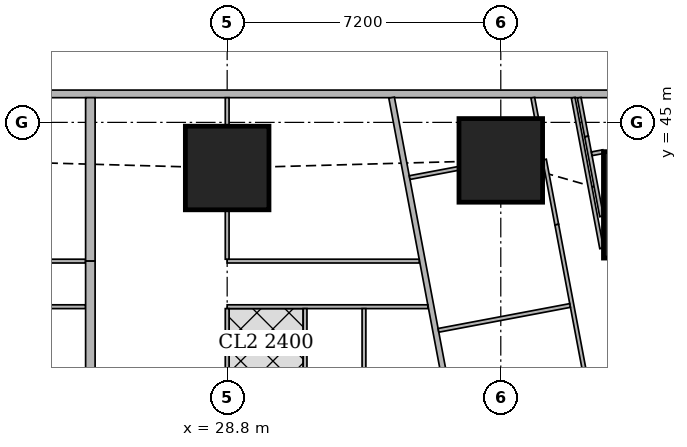
"""IFC4 building model, lengths in metres.
Left out: names, types, materials, properties, quantities, classifications, styles, units other than length and angle.
Written with IfcOpenShell. Run it as: python <this file> out.ifc"""

import sys

from ifc_helpers import new_model, si_unit, direction, frame, frame_2d, origin, origin_2d, place, context, subcontext, project, spatial, rectangle, extrude, element, fill, save


model = new_model("IFC4")
c1 = context("Model", 3, precision=1e-05, world=origin(), true_north=direction((0.0, 1.0)))
c2 = subcontext(c1, "Body", "Model", "MODEL_VIEW")
j1 = project(units=[si_unit("LENGTHUNIT", "METRE"), si_unit("PLANEANGLEUNIT", "RADIAN")], contexts=[c1])
p1 = place(None, origin())
s1 = spatial("IfcSite", under=j1, at=p1, CompositionType="ELEMENT")
p2 = place(p1, origin())
s2 = spatial("IfcBuilding", under=s1, at=p2, CompositionType="ELEMENT")
p3 = place(p2, frame((0.0, 0.0, 89.15)))
s3 = spatial("IfcBuildingStorey", under=s2, at=p3, CompositionType="ELEMENT", Elevation=89.15)
p4 = place(p3, frame((40.102, 42.83, 0.0), z_axis=(0.0, 0.0, 1.0), x_axis=(1.0, 0.0, 0.0)))
e1 = element("IfcColumn", 1, at=p4, inside=s3, PredefinedType="COLUMN", context=c2, shape_type="SweptSolid", body=[
    extrude(rectangle(XDim=2.8, YDim=2.8, at=origin_2d()), origin(), (0.0, 0.0, 1.0), 3.75),
])
for number, where, z_axis, x_axis in (
    (2, (28.8, 43.8, 0.0), (0.0, 0.0, 1.0), (1.0, 0.0, 0.0)),
    (3, (36.0, 44.0, 0.0), (0.0, 0.0, 1.0), (1.0, 0.0, 0.0)),
):
    element("IfcColumn", number, at=place(p3, frame(where, z_axis=z_axis, x_axis=x_axis)), inside=s3, PredefinedType="COLUMN", context=c2, shape_type="SweptSolid", body=[
        extrude(rectangle(XDim=2.2, YDim=2.2, at=origin_2d()), origin(), (0.0, 0.0, 1.0), 3.75),
    ])
p5 = place(p3, frame((40.106, 45.75, 0.0), z_axis=(0.0, 0.0, 1.0), x_axis=(-1.0, 0.0, 0.0)))
e4 = element("IfcWall", 4, at=p5, inside=s3, PredefinedType="SOLIDWALL", context=c2, shape_type="SweptSolid", body=[
    extrude(rectangle(XDim=37.943, YDim=0.2, at=frame_2d((18.971, 0.0))), origin(), (0.0, 0.0, 1.0), 3.5),
])
p6 = place(p5, frame((8.606, 0.0, 0.9)))
e5 = element("IfcOpeningElement", 5, at=p6, cuts=e4, PredefinedType="OPENING", context=c2, shape_type="SweptSolid", body=[
    extrude(rectangle(XDim=1.8, YDim=1.5, at=frame_2d((0.9, 0.75))), frame((0.0, 0.11, 0.0), z_axis=(0.0, -1.0, 0.0), x_axis=(1.0, 0.0, 0.0)), (0.0, 0.0, 1.0), 0.22),
])
p7 = place(p5, frame((12.206, 0.0, 0.9)))
e6 = element("IfcOpeningElement", 6, at=p7, cuts=e4, PredefinedType="OPENING", context=c2, shape_type="SweptSolid", body=[
    extrude(rectangle(XDim=1.8, YDim=1.5, at=frame_2d((0.9, 0.75))), frame((0.0, 0.11, 0.0), z_axis=(0.0, -1.0, 0.0), x_axis=(1.0, 0.0, 0.0)), (0.0, 0.0, 1.0), 0.22),
])
p8 = place(p5, frame((15.806, 0.0, 0.9)))
e7 = element("IfcOpeningElement", 7, at=p8, cuts=e4, PredefinedType="OPENING", context=c2, shape_type="SweptSolid", body=[
    extrude(rectangle(XDim=1.8, YDim=1.5, at=frame_2d((0.9, 0.75))), frame((0.0, 0.11, 0.0), z_axis=(0.0, -1.0, 0.0), x_axis=(1.0, 0.0, 0.0)), (0.0, 0.0, 1.0), 0.22),
])
p9 = place(p5, frame((19.406, 0.0, 0.9)))
e8 = element("IfcOpeningElement", 8, at=p9, cuts=e4, PredefinedType="OPENING", context=c2, shape_type="SweptSolid", body=[
    extrude(rectangle(XDim=1.8, YDim=1.5, at=frame_2d((0.9, 0.75))), frame((0.0, 0.11, 0.0), z_axis=(0.0, -1.0, 0.0), x_axis=(1.0, 0.0, 0.0)), (0.0, 0.0, 1.0), 0.22),
])
p10 = place(p5, frame((23.006, 0.0, 0.9)))
e9 = element("IfcOpeningElement", 9, at=p10, cuts=e4, PredefinedType="OPENING", context=c2, shape_type="SweptSolid", body=[
    extrude(rectangle(XDim=1.8, YDim=1.5, at=frame_2d((0.9, 0.75))), frame((0.0, 0.11, 0.0), z_axis=(0.0, -1.0, 0.0), x_axis=(1.0, 0.0, 0.0)), (0.0, 0.0, 1.0), 0.22),
])
p11 = place(p5, frame((26.606, 0.0, 0.9)))
e10 = element("IfcOpeningElement", 10, at=p11, cuts=e4, PredefinedType="OPENING", context=c2, shape_type="SweptSolid", body=[
    extrude(rectangle(XDim=1.8, YDim=1.5, at=frame_2d((0.9, 0.75))), frame((0.0, 0.11, 0.0), z_axis=(0.0, -1.0, 0.0), x_axis=(1.0, 0.0, 0.0)), (0.0, 0.0, 1.0), 0.22),
])
p12 = place(p3, frame((33.127, 45.65, 0.0), z_axis=(0.0, 0.0, 1.0), x_axis=(0.185598547723, -0.98262565562, 0.0)))
e11 = element("IfcWall", 11, at=p12, inside=s3, PredefinedType="SOLIDWALL", context=c2, shape_type="SweptSolid", body=[
    extrude(rectangle(XDim=47.118, YDim=0.15, at=frame_2d((23.559, 0.0))), origin(), (0.0, 0.0, 1.0), 2.2),
])
p13 = place(p12, frame((15.285, 0.0, 0.0)))
e12 = element("IfcOpeningElement", 12, at=p13, cuts=e11, PredefinedType="OPENING", context=c2, shape_type="SweptSolid", body=[
    extrude(rectangle(XDim=1.0, YDim=2.1, at=frame_2d((0.5, 1.05))), frame((0.0, 0.085, 0.0), z_axis=(0.0, -1.0, 0.0), x_axis=(1.0, 0.0, 0.0)), (0.0, 0.0, 1.0), 0.17),
])
p14 = place(p12, frame((19.102, 0.0, 0.0)))
e13 = element("IfcOpeningElement", 13, at=p14, cuts=e11, PredefinedType="OPENING", context=c2, shape_type="SweptSolid", body=[
    extrude(rectangle(XDim=1.0, YDim=2.1, at=frame_2d((0.5, 1.05))), frame((0.0, 0.085, 0.0), z_axis=(0.0, -1.0, 0.0), x_axis=(1.0, 0.0, 0.0)), (0.0, 0.0, 1.0), 0.17),
])
p15 = place(p12, frame((33.88, 0.0, 0.0)))
e14 = element("IfcOpeningElement", 14, at=p15, cuts=e11, PredefinedType="OPENING", context=c2, shape_type="SweptSolid", body=[
    extrude(rectangle(XDim=1.0, YDim=2.1, at=frame_2d((0.5, 1.05))), frame((0.0, 0.085, 0.0), z_axis=(0.0, -1.0, 0.0), x_axis=(1.0, 0.0, 0.0)), (0.0, 0.0, 1.0), 0.17),
])
p16 = place(p3, frame((38.654, 41.686, 0.0), z_axis=(0.0, 0.0, 1.0), x_axis=(-0.185676896978, 0.982610853761, 0.0)))
e15 = element("IfcWall", 15, at=p16, inside=s3, PredefinedType="PARTITIONING", context=c2, shape_type="SweptSolid", body=[
    extrude(rectangle(XDim=4.034, YDim=0.1, at=frame_2d((2.017, 0.0))), origin(), (0.0, 0.0, 1.0), 2.05),
])
p17 = place(p3, frame((38.063, 45.65, 0.0), z_axis=(0.0, 0.0, 1.0), x_axis=(0.185677287841, -0.982610779902, 0.0)))
e16 = element("IfcWall", 16, at=p17, inside=s3, PredefinedType="PARTITIONING", context=c2, shape_type="SweptSolid", body=[
    extrude(rectangle(XDim=1.04, YDim=0.1, at=frame_2d((0.52, 0.0))), origin(), (0.0, 0.0, 1.0), 3.5),
])
p18 = place(p3, frame((38.256, 44.628, 0.0), z_axis=(0.0, 0.0, 1.0), x_axis=(0.185757524649, -0.982595614704, 0.0)))
e17 = element("IfcWall", 17, at=p18, inside=s3, PredefinedType="PARTITIONING", context=c2, shape_type="SweptSolid", body=[
    extrude(rectangle(XDim=2.137, YDim=0.1, at=frame_2d((1.068, 0.0))), origin(), (0.0, 0.0, 1.0), 2.05),
])
p19 = place(p3, frame((38.862, 41.42, 0.0), z_axis=(0.0, 0.0, 1.0), x_axis=(0.185574815416, -0.982630137887, 0.0)))
e18 = element("IfcWall", 18, at=p19, inside=s3, PredefinedType="PARTITIONING", context=c2, shape_type="SweptSolid", body=[
    extrude(rectangle(XDim=8.605, YDim=0.1, at=frame_2d((4.303, 0.0))), origin(), (0.0, 0.0, 1.0), 3.5),
])
p20 = place(p19, frame((7.555, 0.0, 0.0)))
e19 = element("IfcOpeningElement", 19, at=p20, cuts=e18, PredefinedType="OPENING", context=c2, shape_type="SweptSolid", body=[
    extrude(rectangle(XDim=0.9, YDim=2.1, at=frame_2d((0.45, 1.05))), frame((0.0, 0.06, 0.0), z_axis=(0.0, -1.0, 0.0), x_axis=(1.0, 0.0, 0.0)), (0.0, 0.0, 1.0), 0.12),
])
p21 = place(p19, frame((3.579, 0.0, 0.0)))
e20 = element("IfcOpeningElement", 20, at=p21, cuts=e18, PredefinedType="OPENING", context=c2, shape_type="SweptSolid", body=[
    extrude(rectangle(XDim=0.9, YDim=2.1, at=frame_2d((0.45, 1.05))), frame((0.0, 0.06, 0.0), z_axis=(0.0, -1.0, 0.0), x_axis=(1.0, 0.0, 0.0)), (0.0, 0.0, 1.0), 0.12),
])
p22 = place(p3, frame((36.842, 45.65, 0.0), z_axis=(0.0, 0.0, 1.0), x_axis=(0.185764109712, -0.98259436979, 0.0)))
e21 = element("IfcWall", 21, at=p22, inside=s3, PredefinedType="PARTITIONING", context=c2, shape_type="SweptSolid", body=[
    extrude(rectangle(XDim=0.549, YDim=0.1, at=frame_2d((0.275, 0.0))), origin(), (0.0, 0.0, 1.0), 3.5),
])
p23 = place(p3, frame((37.149, 44.022, 0.0), z_axis=(0.0, 0.0, 1.0), x_axis=(0.185844162065, -0.982579232137, 0.0)))
e22 = element("IfcWall", 22, at=p23, inside=s3, PredefinedType="PARTITIONING", context=c2, shape_type="SweptSolid", body=[
    extrude(rectangle(XDim=1.743, YDim=0.1, at=frame_2d((0.872, 0.0))), origin(), (0.0, 0.0, 1.0), 2.05),
])
p24 = place(p3, frame((37.473, 42.309, 0.0), z_axis=(0.0, 0.0, 1.0), x_axis=(0.185491912953, -0.982645790827, 0.0)))
e23 = element("IfcWall", 23, at=p24, inside=s3, PredefinedType="PARTITIONING", context=c2, shape_type="SweptSolid", body=[
    extrude(rectangle(XDim=9.737, YDim=0.1, at=frame_2d((4.869, 0.0))), origin(), (0.0, 0.0, 1.0), 3.5),
])
p25 = place(p24, frame((8.312, 0.0, 0.0)))
e24 = element("IfcOpeningElement", 24, at=p25, cuts=e23, PredefinedType="OPENING", context=c2, shape_type="SweptSolid", body=[
    extrude(rectangle(XDim=0.9, YDim=2.1, at=frame_2d((0.45, 1.05))), frame((0.0, 0.06, 0.0), z_axis=(0.0, -1.0, 0.0), x_axis=(1.0, 0.0, 0.0)), (0.0, 0.0, 1.0), 0.12),
])
p26 = place(p24, frame((2.853, 0.0, 0.0)))
e25 = element("IfcOpeningElement", 25, at=p26, cuts=e23, PredefinedType="OPENING", context=c2, shape_type="SweptSolid", body=[
    extrude(rectangle(XDim=0.9, YDim=2.1, at=frame_2d((0.45, 1.05))), frame((0.0, 0.06, 0.0), z_axis=(0.0, -1.0, 0.0), x_axis=(1.0, 0.0, 0.0)), (0.0, 0.0, 1.0), 0.12),
])
p27 = place(p24, frame((5.644, 0.0, 0.0)))
e26 = element("IfcOpeningElement", 26, at=p27, cuts=e23, PredefinedType="OPENING", context=c2, shape_type="SweptSolid", body=[
    extrude(rectangle(XDim=0.9, YDim=2.1, at=frame_2d((0.45, 1.05))), frame((0.0, 0.06, 0.0), z_axis=(0.0, -1.0, 0.0), x_axis=(1.0, 0.0, 0.0)), (0.0, 0.0, 1.0), 0.12),
])
p28 = place(p3, frame((38.692, 44.23, 0.0), z_axis=(0.0, 0.0, 1.0), x_axis=(-0.982944840311, -0.183900627803, 0.0)))
e27 = element("IfcWall", 27, at=p28, inside=s3, PredefinedType="PARTITIONING", context=c2, shape_type="SweptSolid", body=[
    extrude(rectangle(XDim=0.304, YDim=0.1, at=frame_2d((0.152, 0.0))), origin(), (0.0, 0.0, 1.0), 2.05),
])
p29 = place(p3, frame((34.89, 43.79, 0.0), z_axis=(0.0, 0.0, 1.0), x_axis=(-0.982696831521, -0.185221319826, 0.0)))
e28 = element("IfcWall", 28, at=p29, inside=s3, PredefinedType="PARTITIONING", context=c2, shape_type="SweptSolid", body=[
    extrude(rectangle(XDim=1.312, YDim=0.1, at=frame_2d((0.656, 0.0))), origin(), (0.0, 0.0, 1.0), 2.05),
])
p30 = place(p3, frame((37.823, 40.182, 0.0), z_axis=(0.0, 0.0, 1.0), x_axis=(-0.98263926043, -0.185526504472, 0.0)))
e29 = element("IfcWall", 29, at=p30, inside=s3, PredefinedType="PARTITIONING", context=c2, shape_type="SweptSolid", body=[
    extrude(rectangle(XDim=3.524, YDim=0.1, at=frame_2d((1.762, 0.0))), origin(), (0.0, 0.0, 1.0), 3.5),
])
p31 = place(p3, frame((21.6, 41.35, 0.0), z_axis=(0.0, 0.0, 1.0), x_axis=(1.0, 0.0, 0.0)))
e30 = element("IfcWall", 30, at=p31, inside=s3, PredefinedType="PARTITIONING", context=c2, shape_type="SweptSolid", body=[
    extrude(rectangle(XDim=3.475, YDim=0.1, at=frame_2d((1.737, 0.0))), origin(), (0.0, 0.0, 1.0), 3.5),
])
p32 = place(p31, frame((0.2, 0.0, 0.0)))
e31 = element("IfcOpeningElement", 31, at=p32, cuts=e30, PredefinedType="OPENING", context=c2, shape_type="SweptSolid", body=[
    extrude(rectangle(XDim=0.9, YDim=2.1, at=frame_2d((0.45, 1.05))), frame((0.0, 0.06, 0.0), z_axis=(0.0, -1.0, 0.0), x_axis=(1.0, 0.0, 0.0)), (0.0, 0.0, 1.0), 0.12),
])
p33 = place(p3, frame((21.6, 40.15, 0.0), z_axis=(0.0, 0.0, 1.0), x_axis=(1.0, 0.0, 0.0)))
e32 = element("IfcWall", 32, at=p33, inside=s3, PredefinedType="PARTITIONING", context=c2, shape_type="SweptSolid", body=[
    extrude(rectangle(XDim=3.475, YDim=0.1, at=frame_2d((1.737, 0.0))), origin(), (0.0, 0.0, 1.0), 3.5),
])
p34 = place(p33, frame((0.575, 0.0, 0.0)))
e33 = element("IfcOpeningElement", 33, at=p34, cuts=e32, PredefinedType="OPENING", context=c2, shape_type="SweptSolid", body=[
    extrude(rectangle(XDim=0.9, YDim=2.1, at=frame_2d((0.45, 1.05))), frame((0.0, 0.06, 0.0), z_axis=(0.0, -1.0, 0.0), x_axis=(1.0, 0.0, 0.0)), (0.0, 0.0, 1.0), 0.12),
])
p35 = place(p33, frame((2.375, 0.0, 0.0)))
e34 = element("IfcOpeningElement", 34, at=p35, cuts=e32, PredefinedType="OPENING", context=c2, shape_type="SweptSolid", body=[
    extrude(rectangle(XDim=0.9, YDim=2.1, at=frame_2d((0.45, 1.05))), frame((0.0, 0.06, 0.0), z_axis=(0.0, -1.0, 0.0), x_axis=(1.0, 0.0, 0.0)), (0.0, 0.0, 1.0), 0.12),
])
p36 = place(p3, frame((28.8, 41.35, 0.0), z_axis=(0.0, 0.0, 1.0), x_axis=(1.0, 0.0, 0.0)))
e35 = element("IfcWall", 35, at=p36, inside=s3, PredefinedType="PARTITIONING", context=c2, shape_type="SweptSolid", body=[
    extrude(rectangle(XDim=5.053, YDim=0.1, at=frame_2d((2.526, 0.0))), origin(), (0.0, 0.0, 1.0), 3.5),
])
p37 = place(p36, frame((0.2, 0.0, 0.0)))
e36 = element("IfcOpeningElement", 36, at=p37, cuts=e35, PredefinedType="OPENING", context=c2, shape_type="SweptSolid", body=[
    extrude(rectangle(XDim=0.9, YDim=2.1, at=frame_2d((0.45, 1.05))), frame((0.0, 0.06, 0.0), z_axis=(0.0, -1.0, 0.0), x_axis=(1.0, 0.0, 0.0)), (0.0, 0.0, 1.0), 0.12),
])
p38 = place(p3, frame((28.8, 40.15, 0.0), z_axis=(0.0, 0.0, 1.0), x_axis=(1.0, 0.0, 0.0)))
e37 = element("IfcWall", 37, at=p38, inside=s3, PredefinedType="PARTITIONING", context=c2, shape_type="SweptSolid", body=[
    extrude(rectangle(XDim=5.28, YDim=0.1, at=frame_2d((2.64, 0.0))), origin(), (0.0, 0.0, 1.0), 3.5),
])
p39 = place(p38, frame((0.575, 0.0, 0.0)))
e38 = element("IfcOpeningElement", 38, at=p39, cuts=e37, PredefinedType="OPENING", context=c2, shape_type="SweptSolid", body=[
    extrude(rectangle(XDim=0.9, YDim=2.1, at=frame_2d((0.45, 1.05))), frame((0.0, 0.06, 0.0), z_axis=(0.0, -1.0, 0.0), x_axis=(1.0, 0.0, 0.0)), (0.0, 0.0, 1.0), 0.12),
])
p40 = place(p38, frame((4.23, 0.0, 0.0)))
e39 = element("IfcOpeningElement", 39, at=p40, cuts=e37, PredefinedType="OPENING", context=c2, shape_type="SweptSolid", body=[
    extrude(rectangle(XDim=0.9, YDim=2.1, at=frame_2d((0.45, 1.05))), frame((0.0, 0.06, 0.0), z_axis=(0.0, -1.0, 0.0), x_axis=(1.0, 0.0, 0.0)), (0.0, 0.0, 1.0), 0.12),
])
p41 = place(p38, frame((2.375, 0.0, 0.0)))
e40 = element("IfcOpeningElement", 40, at=p41, cuts=e37, PredefinedType="OPENING", context=c2, shape_type="SweptSolid", body=[
    extrude(rectangle(XDim=0.9, YDim=2.1, at=frame_2d((0.45, 1.05))), frame((0.0, 0.06, 0.0), z_axis=(0.0, -1.0, 0.0), x_axis=(1.0, 0.0, 0.0)), (0.0, 0.0, 1.0), 0.12),
])
p42 = place(p3, frame((28.8, 41.4, 0.0), z_axis=(0.0, 0.0, 1.0), x_axis=(0.0, 1.0, 0.0)))
e41 = element("IfcWall", 41, at=p42, inside=s3, PredefinedType="PARTITIONING", context=c2, shape_type="SweptSolid", body=[
    extrude(rectangle(XDim=1.299, YDim=0.1, at=frame_2d((0.649, 0.0))), origin(), (0.0, 0.0, 1.0), 3.5),
])
p43 = place(p3, frame((28.8, 44.901, 0.0), z_axis=(0.0, 0.0, 1.0), x_axis=(0.0, 1.0, 0.0)))
e42 = element("IfcWall", 42, at=p43, inside=s3, PredefinedType="PARTITIONING", context=c2, shape_type="SweptSolid", body=[
    extrude(rectangle(XDim=0.749, YDim=0.1, at=frame_2d((0.375, 0.0))), origin(), (0.0, 0.0, 1.0), 3.5),
])
p44 = place(p3, frame((28.8, 38.301, 0.0), z_axis=(0.0, 0.0, 1.0), x_axis=(0.0, 1.0, 0.0)))
e43 = element("IfcWall", 43, at=p44, inside=s3, PredefinedType="PARTITIONING", context=c2, shape_type="SweptSolid", body=[
    extrude(rectangle(XDim=1.799, YDim=0.1, at=frame_2d((0.899, 0.0))), origin(), (0.0, 0.0, 1.0), 3.5),
])
for number, where, z_axis, x_axis in (
    (44, (32.4, 36.575, 0.0), (0.0, 0.0, 1.0), (0.0, 1.0, 0.0)),
    (45, (30.85, 36.575, 0.0), (0.0, 0.0, 1.0), (0.0, 1.0, 0.0)),
):
    element("IfcWall", number, at=place(p3, frame(where, z_axis=z_axis, x_axis=x_axis)), inside=s3, PredefinedType="PARTITIONING", context=c2, shape_type="SweptSolid", body=[
        extrude(rectangle(XDim=3.525, YDim=0.1, at=frame_2d((1.763, 0.0))), origin(), (0.0, 0.0, 1.0), 3.5),
    ])
p45 = place(p3, frame((25.2, 41.35, 0.0), z_axis=(0.0, 0.0, 1.0), x_axis=(0.0, 1.0, 0.0)))
e46 = element("IfcWall", 46, at=p45, inside=s3, PredefinedType="SOLIDWALL", context=c2, shape_type="SweptSolid", body=[
    extrude(rectangle(XDim=4.3, YDim=0.25, at=frame_2d((2.15, 0.0))), origin(), (0.0, 0.0, 1.0), 2.2),
])
p46 = place(p3, frame((25.2, 36.575, 0.0), z_axis=(0.0, 0.0, 1.0), x_axis=(0.0, 1.0, 0.0)))
e47 = element("IfcWall", 47, at=p46, inside=s3, PredefinedType="SOLIDWALL", context=c2, shape_type="SweptSolid", body=[
    extrude(rectangle(XDim=4.775, YDim=0.25, at=frame_2d((2.388, 0.0))), origin(), (0.0, 0.0, 1.0), 3.5),
])
p47 = place(p6, origin())
e48 = element("IfcWindow", 48, at=p47, inside=s3, PartitioningType="SINGLE_PANEL", PredefinedType="WINDOW", context=c2, shape_type="SweptSolid", body=[
    extrude(rectangle(XDim=1.8, YDim=1.5, at=frame_2d((0.9, 0.75))), frame((0.0, 0.03, 0.0), z_axis=(0.0, -1.0, 0.0), x_axis=(1.0, 0.0, 0.0)), (0.0, 0.0, 1.0), 0.06),
])
fill(e5, e48)
p48 = place(p7, origin())
e49 = element("IfcWindow", 49, at=p48, inside=s3, PartitioningType="SINGLE_PANEL", PredefinedType="WINDOW", context=c2, shape_type="SweptSolid", body=[
    extrude(rectangle(XDim=1.8, YDim=1.5, at=frame_2d((0.9, 0.75))), frame((0.0, 0.03, 0.0), z_axis=(0.0, -1.0, 0.0), x_axis=(1.0, 0.0, 0.0)), (0.0, 0.0, 1.0), 0.06),
])
fill(e6, e49)
p49 = place(p8, origin())
e50 = element("IfcWindow", 50, at=p49, inside=s3, PartitioningType="SINGLE_PANEL", PredefinedType="WINDOW", context=c2, shape_type="SweptSolid", body=[
    extrude(rectangle(XDim=1.8, YDim=1.5, at=frame_2d((0.9, 0.75))), frame((0.0, 0.03, 0.0), z_axis=(0.0, -1.0, 0.0), x_axis=(1.0, 0.0, 0.0)), (0.0, 0.0, 1.0), 0.06),
])
fill(e7, e50)
p50 = place(p26, origin())
e51 = element("IfcDoor", 51, at=p50, inside=s3, OperationType="SINGLE_SWING_RIGHT", PredefinedType="DOOR", context=c2, shape_type="SweptSolid", body=[
    extrude(rectangle(XDim=0.9, YDim=2.1, at=frame_2d((0.45, 1.05))), frame((0.0, 0.025, 0.0), z_axis=(0.0, -1.0, 0.0), x_axis=(1.0, 0.0, 0.0)), (0.0, 0.0, 1.0), 0.05),
])
fill(e25, e51)
p51 = place(p35, origin())
e52 = element("IfcDoor", 52, at=p51, inside=s3, OperationType="SINGLE_SWING_LEFT", PredefinedType="DOOR", context=c2, shape_type="SweptSolid", body=[
    extrude(rectangle(XDim=0.9, YDim=2.1, at=frame_2d((0.45, 1.05))), frame((0.0, 0.025, 0.0), z_axis=(0.0, -1.0, 0.0), x_axis=(1.0, 0.0, 0.0)), (0.0, 0.0, 1.0), 0.05),
])
fill(e34, e52)
p52 = place(p37, origin())
e53 = element("IfcDoor", 53, at=p52, inside=s3, OperationType="SINGLE_SWING_RIGHT", PredefinedType="DOOR", context=c2, shape_type="SweptSolid", body=[
    extrude(rectangle(XDim=0.9, YDim=2.1, at=frame_2d((0.45, 1.05))), frame((0.0, 0.025, 0.0), z_axis=(0.0, -1.0, 0.0), x_axis=(1.0, 0.0, 0.0)), (0.0, 0.0, 1.0), 0.05),
])
fill(e36, e53)
p53 = place(p39, origin())
e54 = element("IfcDoor", 54, at=p53, inside=s3, OperationType="SINGLE_SWING_RIGHT", PredefinedType="DOOR", context=c2, shape_type="SweptSolid", body=[
    extrude(rectangle(XDim=0.9, YDim=2.1, at=frame_2d((0.45, 1.05))), frame((0.0, 0.025, 0.0), z_axis=(0.0, -1.0, 0.0), x_axis=(1.0, 0.0, 0.0)), (0.0, 0.0, 1.0), 0.05),
])
fill(e38, e54)
p54 = place(p40, origin())
e55 = element("IfcDoor", 55, at=p54, inside=s3, OperationType="SINGLE_SWING_LEFT", PredefinedType="DOOR", context=c2, shape_type="SweptSolid", body=[
    extrude(rectangle(XDim=0.9, YDim=2.1, at=frame_2d((0.45, 1.05))), frame((0.0, 0.025, 0.0), z_axis=(0.0, -1.0, 0.0), x_axis=(1.0, 0.0, 0.0)), (0.0, 0.0, 1.0), 0.05),
])
fill(e39, e55)
p55 = place(p41, origin())
e56 = element("IfcDoor", 56, at=p55, inside=s3, OperationType="SINGLE_SWING_LEFT", PredefinedType="DOOR", context=c2, shape_type="SweptSolid", body=[
    extrude(rectangle(XDim=0.9, YDim=2.1, at=frame_2d((0.45, 1.05))), frame((0.0, 0.025, 0.0), z_axis=(0.0, -1.0, 0.0), x_axis=(1.0, 0.0, 0.0)), (0.0, 0.0, 1.0), 0.05),
])
fill(e40, e56)
save(model, sys.argv[1])
